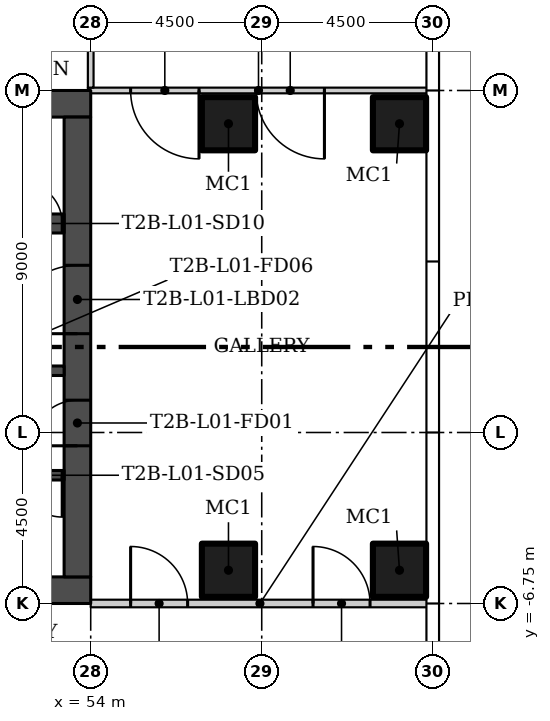
"""IFC4 building model, lengths in metres.
Left out: names, types, materials, properties, quantities, classifications, styles, units other than length and angle.
Written with IfcOpenShell. Run it as: python <this file> out.ifc"""

import sys

from ifc_helpers import new_model, si_unit, direction, frame, frame_2d, origin, origin_2d, place, context, subcontext, project, spatial, rectangle, hollow_rectangle, extrude, element, fill, save


model = new_model("IFC4")
c1 = context("Model", 3, precision=1e-05, world=origin(), true_north=direction((0.0, 1.0)))
c2 = subcontext(c1, "Body", "Model", "MODEL_VIEW")
j1 = project(units=[si_unit("LENGTHUNIT", "METRE"), si_unit("PLANEANGLEUNIT", "RADIAN")], contexts=[c1])
p1 = place(None, origin())
s1 = spatial("IfcSite", under=j1, at=p1, CompositionType="ELEMENT")
p2 = place(p1, origin())
s2 = spatial("IfcBuilding", under=s1, at=p2, CompositionType="ELEMENT")
p3 = place(p2, frame((0.0, 0.0, 6.5)))
s3 = spatial("IfcBuildingStorey", under=s2, at=p3, CompositionType="ELEMENT", Elevation=6.5)
for number, where in (
    (1, (57.625, -5.875, 0.0)),
    (2, (62.125, -5.875, 0.0)),
    (3, (57.625, 5.875, 0.0)),
    (4, (62.125, 5.875, 0.0)),
):
    element("IfcColumn", number, at=place(p3, frame(where)), inside=s3, PredefinedType="COLUMN", context=c2, shape_type="SweptSolid", body=[
        extrude(hollow_rectangle(XDim=1.4, YDim=1.4, WallThickness=0.06, at=origin_2d()), origin(), (0.0, 0.0, 1.0), 5.6),
    ])
p4 = place(p3, frame((62.905, 6.75, 0.0), z_axis=(0.0, 0.0, 1.0), x_axis=(-1.0, 0.0, 0.0)))
e5 = element("IfcWall", 5, at=p4, inside=s3, PredefinedType="PARTITIONING", context=c2, shape_type="SweptSolid", body=[
    extrude(rectangle(XDim=8.98, YDim=0.15, at=frame_2d((4.49, 0.0))), origin(), (0.0, 0.0, 1.0), 5.6),
])
p5 = place(p4, frame((2.755, 0.0, 0.0)))
e6 = element("IfcOpeningElement", 6, at=p5, cuts=e5, PredefinedType="OPENING", context=c2, shape_type="SweptSolid", body=[
    extrude(rectangle(XDim=1.8, YDim=2.4, at=frame_2d((0.9, 1.2))), frame((0.0, 0.085, 0.0), z_axis=(0.0, -1.0, 0.0), x_axis=(1.0, 0.0, 0.0)), (0.0, 0.0, 1.0), 0.17),
])
p6 = place(p4, frame((6.055, 0.0, 0.0)))
e7 = element("IfcOpeningElement", 7, at=p6, cuts=e5, PredefinedType="OPENING", context=c2, shape_type="SweptSolid", body=[
    extrude(rectangle(XDim=1.8, YDim=2.4, at=frame_2d((0.9, 1.2))), frame((0.0, 0.085, 0.0), z_axis=(0.0, -1.0, 0.0), x_axis=(1.0, 0.0, 0.0)), (0.0, 0.0, 1.0), 0.17),
])
p7 = place(p3, frame((54.0, -6.75, 0.0)))
e8 = element("IfcWall", 8, at=p7, inside=s3, PredefinedType="PARTITIONING", context=c2, shape_type="SweptSolid", body=[
    extrude(rectangle(XDim=8.905, YDim=0.2, at=frame_2d((4.453, 0.0))), origin(), (0.0, 0.0, 1.0), 5.6),
])
p8 = place(p7, frame((1.05, 0.0, 0.0)))
e9 = element("IfcOpeningElement", 9, at=p8, cuts=e8, PredefinedType="OPENING", context=c2, shape_type="SweptSolid", body=[
    extrude(rectangle(XDim=1.5, YDim=2.4, at=frame_2d((0.75, 1.2))), frame((0.0, 0.11, 0.0), z_axis=(0.0, -1.0, 0.0), x_axis=(1.0, 0.0, 0.0)), (0.0, 0.0, 1.0), 0.22),
])
p9 = place(p7, frame((5.85, 0.0, 0.0)))
e10 = element("IfcOpeningElement", 10, at=p9, cuts=e8, PredefinedType="OPENING", context=c2, shape_type="SweptSolid", body=[
    extrude(rectangle(XDim=1.5, YDim=2.4, at=frame_2d((0.75, 1.2))), frame((0.0, 0.11, 0.0), z_axis=(0.0, -1.0, 0.0), x_axis=(1.0, 0.0, 0.0)), (0.0, 0.0, 1.0), 0.22),
])
p10 = place(p3, frame((54.0, 15.675, 0.0), z_axis=(0.0, 0.0, 1.0), x_axis=(0.0, -1.0, 0.0)))
e11 = element("IfcWall", 11, at=p10, inside=s3, PredefinedType="PARTITIONING", context=c2, shape_type="SweptSolid", body=[
    extrude(rectangle(XDim=8.85, YDim=0.15, at=frame_2d((4.425, 0.0))), origin(), (0.0, 0.0, 1.0), 5.6),
])
for number, where, z_axis, x_axis in (
    (12, (54.0, -6.4, 0.0), (0.0, 0.0, 1.0), (-1.0, 0.0, 0.0)),
    (13, (54.0, 6.4, 0.0), (0.0, 0.0, 1.0), (-1.0, 0.0, 0.0)),
):
    element("IfcWall", number, at=place(p3, frame(where, z_axis=z_axis, x_axis=x_axis)), inside=s3, PredefinedType="SHEAR", context=c2, shape_type="SweptSolid", body=[
        extrude(rectangle(XDim=13.5, YDim=0.7, at=frame_2d((6.75, 0.0))), origin(), (0.0, 0.0, 1.0), 5.6),
    ])
p11 = place(p3, frame((53.65, -6.05, 0.0), z_axis=(0.0, 0.0, 1.0), x_axis=(0.0, 1.0, 0.0)))
e14 = element("IfcWall", 14, at=p11, inside=s3, PredefinedType="SHEAR", context=c2, shape_type="SweptSolid", body=[
    extrude(rectangle(XDim=12.1, YDim=0.7, at=frame_2d((6.05, 0.0))), origin(), (0.0, 0.0, 1.0), 5.6),
])
p12 = place(p11, frame((3.45, 0.0, 0.0)))
e15 = element("IfcOpeningElement", 15, at=p12, cuts=e14, PredefinedType="OPENING", context=c2, shape_type="SweptSolid", body=[
    extrude(rectangle(XDim=1.2, YDim=2.1, at=frame_2d((0.6, 1.05))), frame((0.0, 0.36, 0.0), z_axis=(0.0, -1.0, 0.0), x_axis=(1.0, 0.0, 0.0)), (0.0, 0.0, 1.0), 0.72),
])
p13 = place(p11, frame((6.4, 0.0, 0.0)))
e16 = element("IfcOpeningElement", 16, at=p13, cuts=e14, PredefinedType="OPENING", context=c2, shape_type="SweptSolid", body=[
    extrude(rectangle(XDim=1.8, YDim=2.4, at=frame_2d((0.9, 1.2))), frame((0.0, 0.36, 0.0), z_axis=(0.0, -1.0, 0.0), x_axis=(1.0, 0.0, 0.0)), (0.0, 0.0, 1.0), 0.72),
])
p14 = place(p3, frame((53.3, -3.375, 0.0), z_axis=(0.0, 0.0, 1.0), x_axis=(-1.0, 0.0, 0.0)))
e17 = element("IfcWall", 17, at=p14, inside=s3, PredefinedType="SHEAR", context=c2, shape_type="SweptSolid", body=[
    extrude(rectangle(XDim=12.1, YDim=0.25, at=frame_2d((6.05, 0.0))), origin(), (0.0, 0.0, 1.0), 5.6),
])
p15 = place(p14, frame((0.05, 0.0, 0.0)))
e18 = element("IfcOpeningElement", 18, at=p15, cuts=e17, PredefinedType="OPENING", context=c2, shape_type="SweptSolid", body=[
    extrude(rectangle(XDim=1.1, YDim=2.1, at=frame_2d((0.55, 1.05))), frame((0.0, 0.135, 0.0), z_axis=(0.0, -1.0, 0.0), x_axis=(1.0, 0.0, 0.0)), (0.0, 0.0, 1.0), 0.27),
])
p16 = place(p3, frame((53.3, -0.625, 0.0), z_axis=(0.0, 0.0, 1.0), x_axis=(-1.0, 0.0, 0.0)))
e19 = element("IfcWall", 19, at=p16, inside=s3, PredefinedType="SHEAR", context=c2, shape_type="SweptSolid", body=[
    extrude(rectangle(XDim=12.1, YDim=0.25, at=frame_2d((6.05, 0.0))), origin(), (0.0, 0.0, 1.0), 5.6),
])
p17 = place(p16, frame((2.25, 0.0, 0.0)))
e20 = element("IfcOpeningElement", 20, at=p17, cuts=e19, PredefinedType="OPENING", context=c2, shape_type="SweptSolid", body=[
    extrude(rectangle(XDim=1.2, YDim=2.1, at=frame_2d((0.6, 1.05))), frame((0.0, 0.135, 0.0), z_axis=(0.0, -1.0, 0.0), x_axis=(1.0, 0.0, 0.0)), (0.0, 0.0, 1.0), 0.27),
])
p18 = place(p16, frame((9.5, 0.0, 0.0)))
e21 = element("IfcOpeningElement", 21, at=p18, cuts=e19, PredefinedType="OPENING", context=c2, shape_type="SweptSolid", body=[
    extrude(rectangle(XDim=0.9, YDim=2.1, at=frame_2d((0.45, 1.05))), frame((0.0, 0.135, 0.0), z_axis=(0.0, -1.0, 0.0), x_axis=(1.0, 0.0, 0.0)), (0.0, 0.0, 1.0), 0.27),
])
p19 = place(p16, frame((11.125, 0.0, 0.0)))
e22 = element("IfcOpeningElement", 22, at=p19, cuts=e19, PredefinedType="OPENING", context=c2, shape_type="SweptSolid", body=[
    extrude(rectangle(XDim=0.9, YDim=2.1, at=frame_2d((0.45, 1.05))), frame((0.0, 0.135, 0.0), z_axis=(0.0, -1.0, 0.0), x_axis=(1.0, 0.0, 0.0)), (0.0, 0.0, 1.0), 0.27),
])
p20 = place(p3, frame((46.0, 3.25, 0.0)))
e23 = element("IfcWall", 23, at=p20, inside=s3, PredefinedType="SHEAR", context=c2, shape_type="SweptSolid", body=[
    extrude(rectangle(XDim=7.3, YDim=0.5, at=frame_2d((3.65, 0.0))), origin(), (0.0, 0.0, 1.0), 5.6),
])
p21 = place(p20, frame((6.15, 0.0, 0.0)))
e24 = element("IfcOpeningElement", 24, at=p21, cuts=e23, PredefinedType="OPENING", context=c2, shape_type="SweptSolid", body=[
    extrude(rectangle(XDim=1.1, YDim=2.1, at=frame_2d((0.55, 1.05))), frame((0.0, 0.26, 0.0), z_axis=(0.0, -1.0, 0.0), x_axis=(1.0, 0.0, 0.0)), (0.0, 0.0, 1.0), 0.52),
])
p22 = place(p8, origin())
e25 = element("IfcDoor", 25, at=p22, inside=s3, OperationType="DOUBLE_DOOR_SINGLE_SWING", PredefinedType="DOOR", context=c2, shape_type="SweptSolid", body=[
    extrude(rectangle(XDim=1.5, YDim=2.4, at=frame_2d((0.75, 1.2))), frame((0.0, 0.025, 0.0), z_axis=(0.0, -1.0, 0.0), x_axis=(1.0, 0.0, 0.0)), (0.0, 0.0, 1.0), 0.05),
])
fill(e9, e25)
p23 = place(p9, origin())
e26 = element("IfcDoor", 26, at=p23, inside=s3, OperationType="DOUBLE_DOOR_SINGLE_SWING", PredefinedType="DOOR", context=c2, shape_type="SweptSolid", body=[
    extrude(rectangle(XDim=1.5, YDim=2.4, at=frame_2d((0.75, 1.2))), frame((0.0, 0.025, 0.0), z_axis=(0.0, -1.0, 0.0), x_axis=(1.0, 0.0, 0.0)), (0.0, 0.0, 1.0), 0.05),
])
fill(e10, e26)
p24 = place(p5, origin())
e27 = element("IfcDoor", 27, at=p24, inside=s3, OperationType="DOUBLE_DOOR_SINGLE_SWING", PredefinedType="DOOR", context=c2, shape_type="SweptSolid", body=[
    extrude(rectangle(XDim=1.8, YDim=2.4, at=frame_2d((0.9, 1.2))), frame((0.0, 0.025, 0.0), z_axis=(0.0, -1.0, 0.0), x_axis=(1.0, 0.0, 0.0)), (0.0, 0.0, 1.0), 0.05),
])
fill(e6, e27)
p25 = place(p6, origin())
e28 = element("IfcDoor", 28, at=p25, inside=s3, OperationType="DOUBLE_DOOR_SINGLE_SWING", PredefinedType="DOOR", context=c2, shape_type="SweptSolid", body=[
    extrude(rectangle(XDim=1.8, YDim=2.4, at=frame_2d((0.9, 1.2))), frame((0.0, 0.025, 0.0), z_axis=(0.0, -1.0, 0.0), x_axis=(1.0, 0.0, 0.0)), (0.0, 0.0, 1.0), 0.05),
])
fill(e7, e28)
p26 = place(p12, origin())
e29 = element("IfcDoor", 29, at=p26, inside=s3, OperationType="SINGLE_SWING_LEFT", PredefinedType="DOOR", context=c2, shape_type="SweptSolid", body=[
    extrude(rectangle(XDim=1.2, YDim=2.1, at=frame_2d((0.6, 1.05))), frame((0.0, 0.025, 0.0), z_axis=(0.0, -1.0, 0.0), x_axis=(1.0, 0.0, 0.0)), (0.0, 0.0, 1.0), 0.05),
])
fill(e15, e29)
p27 = place(p13, origin())
e30 = element("IfcDoor", 30, at=p27, inside=s3, OperationType="DOUBLE_DOOR_SINGLE_SWING", PredefinedType="DOOR", context=c2, shape_type="SweptSolid", body=[
    extrude(rectangle(XDim=1.8, YDim=2.4, at=frame_2d((0.9, 1.2))), frame((0.0, 0.025, 0.0), z_axis=(0.0, -1.0, 0.0), x_axis=(1.0, 0.0, 0.0)), (0.0, 0.0, 1.0), 0.05),
])
fill(e16, e30)
p28 = place(p15, origin())
e31 = element("IfcDoor", 31, at=p28, inside=s3, OperationType="SINGLE_SWING_LEFT", PredefinedType="DOOR", context=c2, shape_type="SweptSolid", body=[
    extrude(rectangle(XDim=1.1, YDim=2.1, at=frame_2d((0.55, 1.05))), frame((0.0, 0.025, 0.0), z_axis=(0.0, -1.0, 0.0), x_axis=(1.0, 0.0, 0.0)), (0.0, 0.0, 1.0), 0.05),
])
fill(e18, e31)
p29 = place(p21, origin())
e32 = element("IfcDoor", 32, at=p29, inside=s3, OperationType="SINGLE_SWING_RIGHT", PredefinedType="DOOR", context=c2, shape_type="SweptSolid", body=[
    extrude(rectangle(XDim=1.1, YDim=2.1, at=frame_2d((0.55, 1.05))), frame((0.0, 0.025, 0.0), z_axis=(0.0, -1.0, 0.0), x_axis=(1.0, 0.0, 0.0)), (0.0, 0.0, 1.0), 0.05),
])
fill(e24, e32)
save(model, sys.argv[1])
